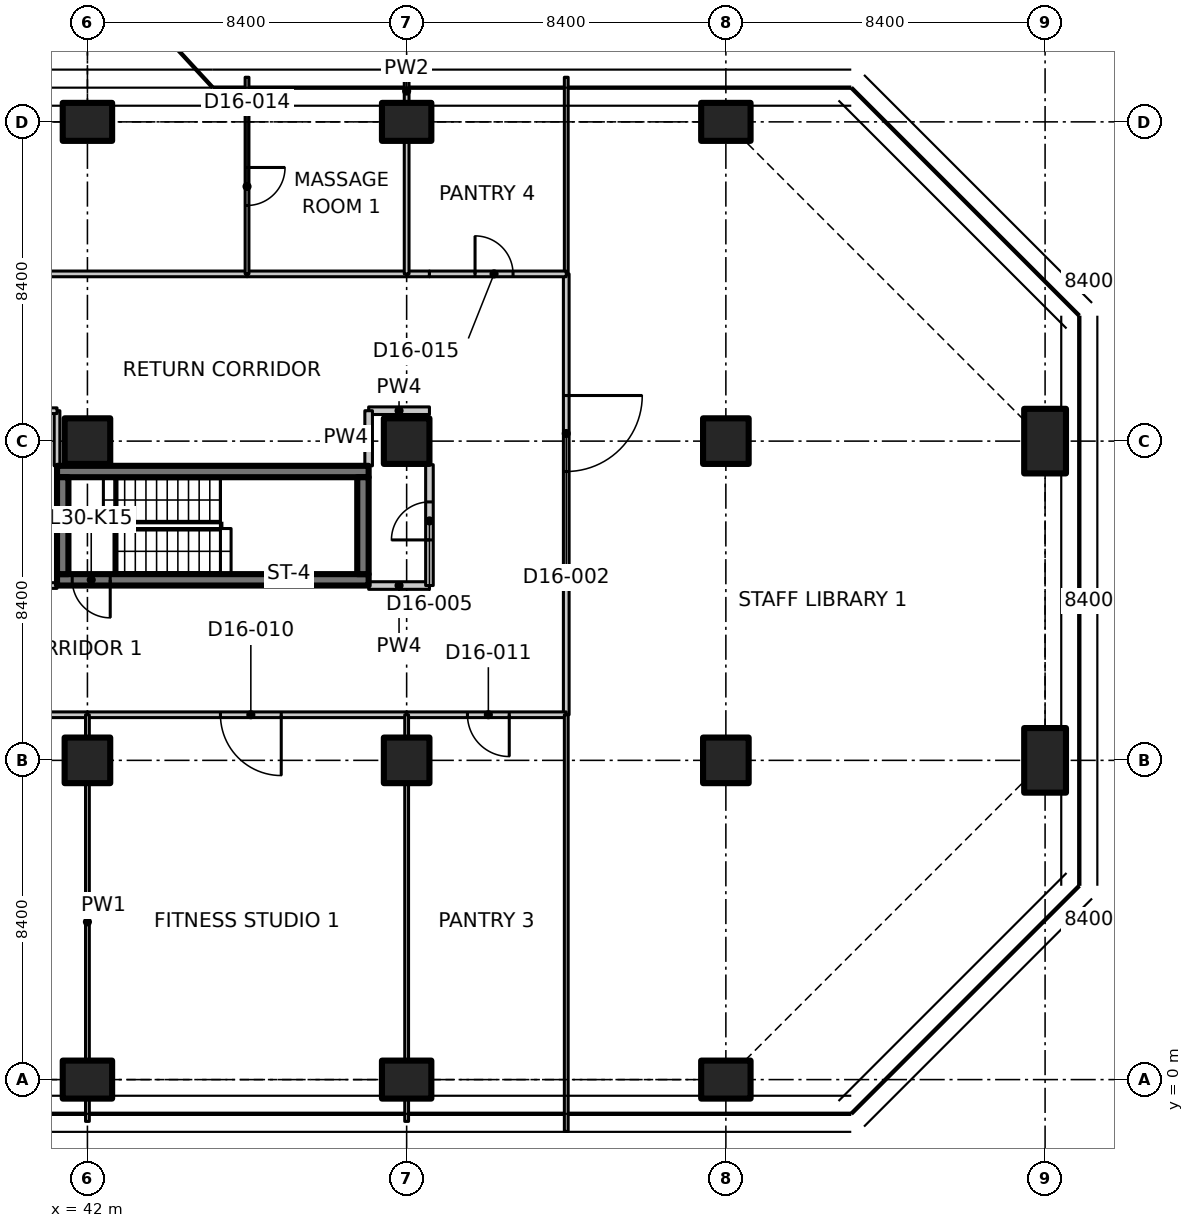
"""IFC4 building model, lengths in metres.
Left out: names, types, materials, properties, quantities, classifications, styles, units other than length and angle.
Written with IfcOpenShell. Run it as: python <this file> out.ifc"""

import sys

from ifc_helpers import new_model, si_unit, direction, frame, frame_2d, origin, origin_2d, place, context, subcontext, project, spatial, polyline, rectangle, outline, extrude, element, fill, save


model = new_model("IFC4")
c1 = context("Model", 3, precision=1e-05, world=origin(), true_north=direction((0.0, 1.0)))
c2 = subcontext(c1, "Body", "Model", "MODEL_VIEW")
j1 = project(units=[si_unit("LENGTHUNIT", "METRE"), si_unit("PLANEANGLEUNIT", "RADIAN")], contexts=[c1])
p1 = place(None, origin())
s1 = spatial("IfcSite", under=j1, at=p1, CompositionType="ELEMENT")
p2 = place(p1, origin())
s2 = spatial("IfcBuilding", under=s1, at=p2, CompositionType="ELEMENT")
p3 = place(p2, frame((0.0, 0.0, 124.1)))
s3 = spatial("IfcBuildingStorey", under=s2, at=p3, CompositionType="ELEMENT", Elevation=124.1)
p4 = place(p3, frame((42.0, 0.0, 0.0), z_axis=(0.0, 0.0, 1.0), x_axis=(0.0, 1.0, 0.0)))
e1 = element("IfcColumn", 1, at=p4, inside=s3, PredefinedType="COLUMN", context=c2, shape_type="SweptSolid", body=[
    extrude(rectangle(XDim=1.0, YDim=1.3, at=origin_2d()), origin(), (0.0, 0.0, 1.0), 3.35),
])
for number, where, z_axis, x_axis in (
    (2, (42.0, 8.4, 0.0), (0.0, 0.0, 1.0), (1.0, 0.0, 0.0)),
    (3, (42.0, 16.8, 0.0), (0.0, 0.0, 1.0), (1.0, 0.0, 0.0)),
):
    element("IfcColumn", number, at=place(p3, frame(where, z_axis=z_axis, x_axis=x_axis)), inside=s3, PredefinedType="COLUMN", context=c2, shape_type="SweptSolid", body=[
        extrude(rectangle(XDim=1.2, YDim=1.2, at=origin_2d()), origin(), (0.0, 0.0, 1.0), 3.35),
    ])
for number, where, z_axis, x_axis in (
    (4, (42.0, 25.2, 0.0), (0.0, 0.0, 1.0), (0.0, 1.0, 0.0)),
    (5, (50.4, 0.0, 0.0), (0.0, 0.0, 1.0), (0.0, 1.0, 0.0)),
):
    element("IfcColumn", number, at=place(p3, frame(where, z_axis=z_axis, x_axis=x_axis)), inside=s3, PredefinedType="COLUMN", context=c2, shape_type="SweptSolid", body=[
        extrude(rectangle(XDim=1.0, YDim=1.3, at=origin_2d()), origin(), (0.0, 0.0, 1.0), 3.35),
    ])
for number, where, z_axis, x_axis in (
    (6, (50.4, 8.4, 0.0), (0.0, 0.0, 1.0), (1.0, 0.0, 0.0)),
    (7, (50.4, 16.8, 0.0), (0.0, 0.0, 1.0), (1.0, 0.0, 0.0)),
):
    element("IfcColumn", number, at=place(p3, frame(where, z_axis=z_axis, x_axis=x_axis)), inside=s3, PredefinedType="COLUMN", context=c2, shape_type="SweptSolid", body=[
        extrude(rectangle(XDim=1.2, YDim=1.2, at=origin_2d()), origin(), (0.0, 0.0, 1.0), 3.35),
    ])
for number, where, z_axis, x_axis in (
    (8, (50.4, 25.2, 0.0), (0.0, 0.0, 1.0), (0.0, 1.0, 0.0)),
    (9, (58.8, 0.0, 0.0), (0.0, 0.0, 1.0), (0.0, 1.0, 0.0)),
):
    element("IfcColumn", number, at=place(p3, frame(where, z_axis=z_axis, x_axis=x_axis)), inside=s3, PredefinedType="COLUMN", context=c2, shape_type="SweptSolid", body=[
        extrude(rectangle(XDim=1.0, YDim=1.3, at=origin_2d()), origin(), (0.0, 0.0, 1.0), 3.35),
    ])
for number, where, z_axis, x_axis in (
    (10, (58.8, 8.4, 0.0), (0.0, 0.0, 1.0), (1.0, 0.0, 0.0)),
    (11, (58.8, 16.8, 0.0), (0.0, 0.0, 1.0), (1.0, 0.0, 0.0)),
):
    element("IfcColumn", number, at=place(p3, frame(where, z_axis=z_axis, x_axis=x_axis)), inside=s3, PredefinedType="COLUMN", context=c2, shape_type="SweptSolid", body=[
        extrude(rectangle(XDim=1.2, YDim=1.2, at=origin_2d()), origin(), (0.0, 0.0, 1.0), 3.35),
    ])
p5 = place(p3, frame((58.8, 25.2, 0.0), z_axis=(0.0, 0.0, 1.0), x_axis=(0.0, 1.0, 0.0)))
e12 = element("IfcColumn", 12, at=p5, inside=s3, PredefinedType="COLUMN", context=c2, shape_type="SweptSolid", body=[
    extrude(rectangle(XDim=1.0, YDim=1.3, at=origin_2d()), origin(), (0.0, 0.0, 1.0), 3.35),
])
for number, where, z_axis, x_axis in (
    (13, (67.2, 8.4, 0.0), (0.0, 0.0, 1.0), (1.0, 0.0, 0.0)),
    (14, (67.2, 16.8, 0.0), (0.0, 0.0, 1.0), (1.0, 0.0, 0.0)),
):
    element("IfcColumn", number, at=place(p3, frame(where, z_axis=z_axis, x_axis=x_axis)), inside=s3, PredefinedType="COLUMN", context=c2, shape_type="SweptSolid", body=[
        extrude(rectangle(XDim=1.1, YDim=1.7, at=origin_2d()), origin(), (0.0, 0.0, 1.0), 3.35),
    ])
p6 = place(p3, frame((49.4, 13.15, 0.0), z_axis=(0.0, 0.0, 1.0), x_axis=(-1.0, 0.0, 0.0)))
e15 = element("IfcWall", 15, at=p6, inside=s3, PredefinedType="SHEAR", context=c2, shape_type="SweptSolid", body=[
    extrude(rectangle(XDim=8.2, YDim=0.3, at=frame_2d((4.1, 0.0))), origin(), (0.0, 0.0, 1.0), 3.35),
])
p7 = place(p6, frame((6.8, 0.0, 0.0)))
e16 = element("IfcOpeningElement", 16, at=p7, cuts=e15, PredefinedType="OPENING", context=c2, shape_type="SweptSolid", body=[
    extrude(rectangle(XDim=1.0, YDim=2.1, at=frame_2d((0.5, 1.05))), frame((0.0, 0.16, 0.0), z_axis=(0.0, -1.0, 0.0), x_axis=(1.0, 0.0, 0.0)), (0.0, 0.0, 1.0), 0.32),
])
p8 = place(p3, frame((41.2, 16.0, 0.0), z_axis=(0.0, 0.0, 1.0), x_axis=(1.0, 0.0, 0.0)))
e17 = element("IfcWall", 17, at=p8, inside=s3, PredefinedType="SHEAR", context=c2, shape_type="SweptSolid", body=[
    extrude(rectangle(XDim=8.2, YDim=0.3, at=frame_2d((4.1, 0.0))), origin(), (0.0, 0.0, 1.0), 3.35),
])
for number, where, z_axis, x_axis in (
    (18, (41.35, 13.3, 0.0), (0.0, 0.0, 1.0), (0.0, 1.0, 0.0)),
    (19, (49.25, 13.3, 0.0), (0.0, 0.0, 1.0), (0.0, 1.0, 0.0)),
):
    element("IfcWall", number, at=place(p3, frame(where, z_axis=z_axis, x_axis=x_axis)), inside=s3, PredefinedType="SHEAR", context=c2, shape_type="SweptSolid", body=[
        extrude(rectangle(XDim=2.55, YDim=0.3, at=frame_2d((1.275, 0.0))), origin(), (0.0, 0.0, 1.0), 3.35),
    ])
p9 = place(p3, frame((54.6, 13.0, 0.0), z_axis=(0.0, 0.0, 1.0), x_axis=(0.0, -1.0, 0.0)))
e20 = element("IfcWall", 20, at=p9, inside=s3, PredefinedType="PARTITIONING", context=c2, shape_type="SweptSolid", body=[
    extrude(rectangle(XDim=3.4, YDim=0.15, at=frame_2d((1.7, 0.0))), origin(), (0.0, 0.0, 1.0), 3.33),
])
p10 = place(p3, frame((33.6, 13.0, 0.0), z_axis=(0.0, 0.0, 1.0), x_axis=(1.0, 0.0, 0.0)))
e21 = element("IfcWall", 21, at=p10, inside=s3, PredefinedType="PARTITIONING", context=c2, shape_type="SweptSolid", body=[
    extrude(rectangle(XDim=7.6, YDim=0.15, at=frame_2d((3.8, 0.0))), origin(), (0.0, 0.0, 1.0), 3.33),
])
p11 = place(p3, frame((49.4, 13.0, 0.0), z_axis=(0.0, 0.0, 1.0), x_axis=(1.0, 0.0, 0.0)))
e22 = element("IfcWall", 22, at=p11, inside=s3, PredefinedType="PARTITIONING", context=c2, shape_type="SweptSolid", body=[
    extrude(rectangle(XDim=1.6, YDim=0.2, at=frame_2d((0.8, 0.0))), origin(), (0.0, 0.0, 1.0), 3.33),
])
p12 = place(p3, frame((42.0, 9.6, 0.0), z_axis=(0.0, 0.0, 1.0), x_axis=(-1.0, 0.0, 0.0)))
e23 = element("IfcWall", 23, at=p12, inside=s3, PredefinedType="PARTITIONING", context=c2, shape_type="SweptSolid", body=[
    extrude(rectangle(XDim=4.2, YDim=0.15, at=frame_2d((2.1, 0.0))), origin(), (0.0, 0.0, 1.0), 3.33),
])
p13 = place(p12, frame((1.5, 0.0, 0.0)))
e24 = element("IfcOpeningElement", 24, at=p13, cuts=e23, PredefinedType="OPENING", context=c2, shape_type="SweptSolid", body=[
    extrude(rectangle(XDim=1.1, YDim=2.1, at=frame_2d((0.55, 1.05))), frame((0.0, 0.085, 0.0), z_axis=(0.0, -1.0, 0.0), x_axis=(1.0, 0.0, 0.0)), (0.0, 0.0, 1.0), 0.17),
])
p14 = place(p3, frame((50.4, 9.6, 0.0), z_axis=(0.0, 0.0, 1.0), x_axis=(-1.0, 0.0, 0.0)))
e25 = element("IfcWall", 25, at=p14, inside=s3, PredefinedType="PARTITIONING", context=c2, shape_type="SweptSolid", body=[
    extrude(rectangle(XDim=8.4, YDim=0.15, at=frame_2d((4.2, 0.0))), origin(), (0.0, 0.0, 1.0), 3.33),
])
p15 = place(p14, frame((3.3, 0.0, 0.0)))
e26 = element("IfcOpeningElement", 26, at=p15, cuts=e25, PredefinedType="OPENING", context=c2, shape_type="SweptSolid", body=[
    extrude(rectangle(XDim=1.6, YDim=2.1, at=frame_2d((0.8, 1.05))), frame((0.0, 0.085, 0.0), z_axis=(0.0, -1.0, 0.0), x_axis=(1.0, 0.0, 0.0)), (0.0, 0.0, 1.0), 0.17),
])
p16 = place(p3, frame((54.6, 9.6, 0.0), z_axis=(0.0, 0.0, 1.0), x_axis=(-1.0, 0.0, 0.0)))
e27 = element("IfcWall", 27, at=p16, inside=s3, PredefinedType="PARTITIONING", context=c2, shape_type="SweptSolid", body=[
    extrude(rectangle(XDim=4.2, YDim=0.15, at=frame_2d((2.1, 0.0))), origin(), (0.0, 0.0, 1.0), 3.33),
])
p17 = place(p16, frame((1.5, 0.0, 0.0)))
e28 = element("IfcOpeningElement", 28, at=p17, cuts=e27, PredefinedType="OPENING", context=c2, shape_type="SweptSolid", body=[
    extrude(rectangle(XDim=1.1, YDim=2.1, at=frame_2d((0.55, 1.05))), frame((0.0, 0.085, 0.0), z_axis=(0.0, -1.0, 0.0), x_axis=(1.0, 0.0, 0.0)), (0.0, 0.0, 1.0), 0.17),
])
p18 = place(p3, frame((54.6, 21.2, 0.0), z_axis=(0.0, 0.0, 1.0), x_axis=(0.0, -1.0, 0.0)))
e29 = element("IfcWall", 29, at=p18, inside=s3, PredefinedType="PARTITIONING", context=c2, shape_type="SweptSolid", body=[
    extrude(rectangle(XDim=8.2, YDim=0.15, at=frame_2d((4.1, 0.0))), origin(), (0.0, 0.0, 1.0), 3.33),
])
p19 = place(p18, frame((3.2, 0.0, 0.0)))
e30 = element("IfcOpeningElement", 30, at=p19, cuts=e29, PredefinedType="OPENING", context=c2, shape_type="SweptSolid", body=[
    extrude(rectangle(XDim=2.0, YDim=2.4, at=frame_2d((1.0, 1.2))), frame((0.0, 0.085, 0.0), z_axis=(0.0, -1.0, 0.0), x_axis=(1.0, 0.0, 0.0)), (0.0, 0.0, 1.0), 0.17),
])
p20 = place(p3, frame((54.6, -1.365, 0.0), z_axis=(0.0, 0.0, 1.0), x_axis=(0.0, 1.0, 0.0)))
e31 = element("IfcWall", 31, at=p20, inside=s3, PredefinedType="PARTITIONING", context=c2, shape_type="SweptSolid", body=[
    extrude(outline(polyline([(0.0, 0.0), (10.965, 0.0), (10.965, 3.33), (1.815, 3.33), (1.813, 2.98), (0.917, 2.98), (0.915, 3.33), (0.265, 3.33), (0.0, 3.33), (0.0, 0.0)])), frame((0.0, 0.05, 0.0), z_axis=(0.0, -1.0, 0.0), x_axis=(1.0, 0.0, 0.0)), (0.0, 0.0, 1.0), 0.1),
])
p21 = place(p3, frame((54.6, 21.2, 0.0), z_axis=(0.0, 0.0, 1.0), x_axis=(0.0, 1.0, 0.0)))
e32 = element("IfcWall", 32, at=p21, inside=s3, PredefinedType="PARTITIONING", context=c2, shape_type="SweptSolid", body=[
    extrude(outline(polyline([(0.0, 0.0), (5.174, 0.0), (5.174, 3.33), (5.1, 3.33), (4.45, 3.33), (4.448, 2.98), (3.552, 2.98), (3.55, 3.33), (0.0, 3.33), (0.0, 0.0)])), frame((0.0, 0.05, 0.0), z_axis=(0.0, -1.0, 0.0), x_axis=(1.0, 0.0, 0.0)), (0.0, 0.0, 1.0), 0.1),
])
p22 = place(p3, frame((41.2, 16.15, 0.0), z_axis=(0.0, 0.0, 1.0), x_axis=(0.0, 1.0, 0.0)))
e33 = element("IfcWall", 33, at=p22, inside=s3, PredefinedType="PARTITIONING", context=c2, shape_type="SweptSolid", body=[
    extrude(rectangle(XDim=1.45, YDim=0.15, at=frame_2d((0.725, 0.0))), origin(), (0.0, 0.0, 1.0), 3.33),
])
p23 = place(p3, frame((41.2, 17.6, 0.0), z_axis=(0.0, 0.0, 1.0), x_axis=(-1.0, 0.0, 0.0)))
e34 = element("IfcWall", 34, at=p23, inside=s3, PredefinedType="PARTITIONING", context=c2, shape_type="SweptSolid", body=[
    extrude(rectangle(XDim=7.6, YDim=0.15, at=frame_2d((3.8, 0.0))), origin(), (0.0, 0.0, 1.0), 3.33),
])
p24 = place(p23, frame((3.3, 0.0, 0.0)))
e35 = element("IfcOpeningElement", 35, at=p24, cuts=e34, PredefinedType="OPENING", context=c2, shape_type="SweptSolid", body=[
    extrude(rectangle(XDim=1.1, YDim=2.1, at=frame_2d((0.55, 1.05))), frame((0.0, 0.085, 0.0), z_axis=(0.0, -1.0, 0.0), x_axis=(1.0, 0.0, 0.0)), (0.0, 0.0, 1.0), 0.17),
])
p25 = place(p3, frame((51.0, 17.6, 0.0), z_axis=(0.0, 0.0, 1.0), x_axis=(-1.0, 0.0, 0.0)))
e36 = element("IfcWall", 36, at=p25, inside=s3, PredefinedType="PARTITIONING", context=c2, shape_type="SweptSolid", body=[
    extrude(rectangle(XDim=1.6, YDim=0.2, at=frame_2d((0.8, 0.0))), origin(), (0.0, 0.0, 1.0), 3.33),
])
p26 = place(p3, frame((49.4, 17.6, 0.0), z_axis=(0.0, 0.0, 1.0), x_axis=(0.0, -1.0, 0.0)))
e37 = element("IfcWall", 37, at=p26, inside=s3, PredefinedType="PARTITIONING", context=c2, shape_type="SweptSolid", body=[
    extrude(rectangle(XDim=1.45, YDim=0.2, at=frame_2d((0.725, 0.0))), origin(), (0.0, 0.0, 1.0), 3.33),
])
p27 = place(p3, frame((33.6, 21.2, 0.0), z_axis=(0.0, 0.0, 1.0), x_axis=(1.0, 0.0, 0.0)))
e38 = element("IfcWall", 38, at=p27, inside=s3, PredefinedType="PARTITIONING", context=c2, shape_type="SweptSolid", body=[
    extrude(rectangle(XDim=12.6, YDim=0.15, at=frame_2d((6.3, 0.0))), origin(), (0.0, 0.0, 1.0), 3.33),
])
p28 = place(p27, frame((5.4, 0.0, 0.0)))
e39 = element("IfcOpeningElement", 39, at=p28, cuts=e38, PredefinedType="OPENING", context=c2, shape_type="SweptSolid", body=[
    extrude(rectangle(XDim=1.6, YDim=2.1, at=frame_2d((0.8, 1.05))), frame((0.0, 0.085, 0.0), z_axis=(0.0, -1.0, 0.0), x_axis=(1.0, 0.0, 0.0)), (0.0, 0.0, 1.0), 0.17),
])
p29 = place(p3, frame((46.2, 21.2, 0.0), z_axis=(0.0, 0.0, 1.0), x_axis=(1.0, 0.0, 0.0)))
e40 = element("IfcWall", 40, at=p29, inside=s3, PredefinedType="PARTITIONING", context=c2, shape_type="SweptSolid", body=[
    extrude(rectangle(XDim=4.2, YDim=0.15, at=frame_2d((2.1, 0.0))), origin(), (0.0, 0.0, 1.0), 3.33),
])
p30 = place(p3, frame((50.4, 21.2, 0.0), z_axis=(0.0, 0.0, 1.0), x_axis=(1.0, 0.0, 0.0)))
e41 = element("IfcWall", 41, at=p30, inside=s3, PredefinedType="PARTITIONING", context=c2, shape_type="SweptSolid", body=[
    extrude(rectangle(XDim=0.6, YDim=0.15, at=frame_2d((0.3, 0.0))), origin(), (0.0, 0.0, 1.0), 3.33),
])
p31 = place(p3, frame((51.0, 13.0, 0.0), z_axis=(0.0, 0.0, 1.0), x_axis=(0.0, 1.0, 0.0)))
e42 = element("IfcWall", 42, at=p31, inside=s3, PredefinedType="PARTITIONING", context=c2, shape_type="SweptSolid", body=[
    extrude(rectangle(XDim=3.18, YDim=0.2, at=frame_2d((1.59, 0.0))), origin(), (0.0, 0.0, 1.0), 3.33),
])
p32 = place(p31, frame((1.2, 0.0, 0.0)))
e43 = element("IfcOpeningElement", 43, at=p32, cuts=e42, PredefinedType="OPENING", context=c2, shape_type="SweptSolid", body=[
    extrude(rectangle(XDim=1.0, YDim=2.1, at=frame_2d((0.5, 1.05))), frame((0.0, 0.11, 0.0), z_axis=(0.0, -1.0, 0.0), x_axis=(1.0, 0.0, 0.0)), (0.0, 0.0, 1.0), 0.22),
])
p33 = place(p3, frame((51.0, 21.2, 0.0), z_axis=(0.0, 0.0, 1.0), x_axis=(1.0, 0.0, 0.0)))
e44 = element("IfcWall", 44, at=p33, inside=s3, PredefinedType="PARTITIONING", context=c2, shape_type="SweptSolid", body=[
    extrude(rectangle(XDim=3.6, YDim=0.15, at=frame_2d((1.8, 0.0))), origin(), (0.0, 0.0, 1.0), 3.33),
])
p34 = place(p33, frame((1.2, 0.0, 0.0)))
e45 = element("IfcOpeningElement", 45, at=p34, cuts=e44, PredefinedType="OPENING", context=c2, shape_type="SweptSolid", body=[
    extrude(rectangle(XDim=1.0, YDim=2.1, at=frame_2d((0.5, 1.05))), frame((0.0, 0.085, 0.0), z_axis=(0.0, -1.0, 0.0), x_axis=(1.0, 0.0, 0.0)), (0.0, 0.0, 1.0), 0.17),
])
p35 = place(p3, frame((42.0, 9.6, 0.0), z_axis=(0.0, 0.0, 1.0), x_axis=(0.0, -1.0, 0.0)))
e46 = element("IfcWall", 46, at=p35, inside=s3, PredefinedType="PARTITIONING", context=c2, shape_type="SweptSolid", body=[
    extrude(rectangle(XDim=0.58, YDim=0.1, at=frame_2d((0.29, 0.0))), origin(), (0.0, 0.0, 1.0), 3.33),
])
p36 = place(p3, frame((42.0, 7.78, 0.0), z_axis=(0.0, 0.0, 1.0), x_axis=(0.0, -1.0, 0.0)))
e47 = element("IfcWall", 47, at=p36, inside=s3, PredefinedType="PARTITIONING", context=c2, shape_type="SweptSolid", body=[
    extrude(rectangle(XDim=7.26, YDim=0.1, at=frame_2d((3.63, 0.0))), origin(), (0.0, 0.0, 1.0), 3.33),
])
for number, where, z_axis, x_axis in (
    (48, (42.0, -0.52, 0.0), (0.0, 0.0, 1.0), (0.0, -1.0, 0.0)),
    (49, (50.4, 9.6, 0.0), (0.0, 0.0, 1.0), (0.0, -1.0, 0.0)),
):
    element("IfcWall", number, at=place(p3, frame(where, z_axis=z_axis, x_axis=x_axis)), inside=s3, PredefinedType="PARTITIONING", context=c2, shape_type="SweptSolid", body=[
        extrude(rectangle(XDim=0.58, YDim=0.1, at=frame_2d((0.29, 0.0))), origin(), (0.0, 0.0, 1.0), 3.33),
    ])
p37 = place(p3, frame((50.4, 7.78, 0.0), z_axis=(0.0, 0.0, 1.0), x_axis=(0.0, -1.0, 0.0)))
e50 = element("IfcWall", 50, at=p37, inside=s3, PredefinedType="PARTITIONING", context=c2, shape_type="SweptSolid", body=[
    extrude(rectangle(XDim=7.26, YDim=0.1, at=frame_2d((3.63, 0.0))), origin(), (0.0, 0.0, 1.0), 3.33),
])
p38 = place(p3, frame((50.4, -0.52, 0.0), z_axis=(0.0, 0.0, 1.0), x_axis=(0.0, -1.0, 0.0)))
e51 = element("IfcWall", 51, at=p38, inside=s3, PredefinedType="PARTITIONING", context=c2, shape_type="SweptSolid", body=[
    extrude(rectangle(XDim=0.58, YDim=0.1, at=frame_2d((0.29, 0.0))), origin(), (0.0, 0.0, 1.0), 3.33),
])
p39 = place(p3, frame((46.2, 26.374, 0.0), z_axis=(0.0, 0.0, 1.0), x_axis=(0.0, -1.0, 0.0)))
e52 = element("IfcWall", 52, at=p39, inside=s3, PredefinedType="PARTITIONING", context=c2, shape_type="SweptSolid", body=[
    extrude(outline(polyline([(0.0, 0.0), (5.174, 0.0), (5.174, 3.33), (1.624, 3.33), (1.622, 2.98), (0.726, 2.98), (0.724, 3.33), (0.074, 3.33), (0.0, 3.33), (0.0, 0.0)])), frame((0.0, 0.05, 0.0), z_axis=(0.0, -1.0, 0.0), x_axis=(1.0, 0.0, 0.0)), (0.0, 0.0, 1.0), 0.1),
])
p40 = place(p39, frame((2.374, 0.0, 0.0)))
e53 = element("IfcOpeningElement", 53, at=p40, cuts=e52, PredefinedType="OPENING", context=c2, shape_type="SweptSolid", body=[
    extrude(rectangle(XDim=1.0, YDim=2.1, at=frame_2d((0.5, 1.05))), frame((0.0, 0.06, 0.0), z_axis=(0.0, -1.0, 0.0), x_axis=(1.0, 0.0, 0.0)), (0.0, 0.0, 1.0), 0.12),
])
p41 = place(p3, frame((50.4, 26.3, 0.0), z_axis=(0.0, 0.0, 1.0), x_axis=(0.0, -1.0, 0.0)))
e54 = element("IfcWall", 54, at=p41, inside=s3, PredefinedType="PARTITIONING", context=c2, shape_type="SweptSolid", body=[
    extrude(rectangle(XDim=0.58, YDim=0.125, at=frame_2d((0.29, 0.0))), origin(), (0.0, 0.0, 1.0), 3.33),
])
p42 = place(p3, frame((50.4, 24.68, 0.0), z_axis=(0.0, 0.0, 1.0), x_axis=(0.0, -1.0, 0.0)))
e55 = element("IfcWall", 55, at=p42, inside=s3, PredefinedType="PARTITIONING", context=c2, shape_type="SweptSolid", body=[
    extrude(rectangle(XDim=3.48, YDim=0.125, at=frame_2d((1.74, 0.0))), origin(), (0.0, 0.0, 1.0), 3.33),
])
p43 = place(p7, origin())
e56 = element("IfcDoor", 56, at=p43, inside=s3, OperationType="SINGLE_SWING_RIGHT", PredefinedType="DOOR", context=c2, shape_type="SweptSolid", body=[
    extrude(rectangle(XDim=1.0, YDim=2.1, at=frame_2d((0.5, 1.05))), frame((0.0, 0.025, 0.0), z_axis=(0.0, -1.0, 0.0), x_axis=(1.0, 0.0, 0.0)), (0.0, 0.0, 1.0), 0.05),
])
fill(e16, e56)
p44 = place(p19, origin())
e57 = element("IfcDoor", 57, at=p44, inside=s3, OperationType="DOUBLE_DOOR_SINGLE_SWING", PredefinedType="DOOR", context=c2, shape_type="SweptSolid", body=[
    extrude(rectangle(XDim=2.0, YDim=2.4, at=frame_2d((1.0, 1.2))), frame((0.0, 0.025, 0.0), z_axis=(0.0, -1.0, 0.0), x_axis=(1.0, 0.0, 0.0)), (0.0, 0.0, 1.0), 0.05),
])
fill(e30, e57)
p45 = place(p32, origin())
e58 = element("IfcDoor", 58, at=p45, inside=s3, OperationType="SINGLE_SWING_LEFT", PredefinedType="DOOR", context=c2, shape_type="SweptSolid", body=[
    extrude(rectangle(XDim=1.0, YDim=2.1, at=frame_2d((0.5, 1.05))), frame((0.0, 0.025, 0.0), z_axis=(0.0, -1.0, 0.0), x_axis=(1.0, 0.0, 0.0)), (0.0, 0.0, 1.0), 0.05),
])
fill(e43, e58)
p46 = place(p15, origin())
e59 = element("IfcDoor", 59, at=p46, inside=s3, OperationType="DOUBLE_DOOR_SINGLE_SWING", PredefinedType="DOOR", context=c2, shape_type="SweptSolid", body=[
    extrude(rectangle(XDim=1.6, YDim=2.1, at=frame_2d((0.8, 1.05))), frame((0.0, 0.025, 0.0), z_axis=(0.0, -1.0, 0.0), x_axis=(1.0, 0.0, 0.0)), (0.0, 0.0, 1.0), 0.05),
])
fill(e26, e59)
p47 = place(p17, origin())
e60 = element("IfcDoor", 60, at=p47, inside=s3, OperationType="SINGLE_SWING_LEFT", PredefinedType="DOOR", context=c2, shape_type="SweptSolid", body=[
    extrude(rectangle(XDim=1.1, YDim=2.1, at=frame_2d((0.55, 1.05))), frame((0.0, 0.025, 0.0), z_axis=(0.0, -1.0, 0.0), x_axis=(1.0, 0.0, 0.0)), (0.0, 0.0, 1.0), 0.05),
])
fill(e28, e60)
p48 = place(p40, origin())
e61 = element("IfcDoor", 61, at=p48, inside=s3, OperationType="SINGLE_SWING_LEFT", PredefinedType="DOOR", context=c2, shape_type="SweptSolid", body=[
    extrude(rectangle(XDim=1.0, YDim=2.1, at=frame_2d((0.5, 1.05))), frame((0.0, 0.025, 0.0), z_axis=(0.0, -1.0, 0.0), x_axis=(1.0, 0.0, 0.0)), (0.0, 0.0, 1.0), 0.05),
])
fill(e53, e61)
p49 = place(p34, origin())
e62 = element("IfcDoor", 62, at=p49, inside=s3, OperationType="SINGLE_SWING_LEFT", PredefinedType="DOOR", context=c2, shape_type="SweptSolid", body=[
    extrude(rectangle(XDim=1.0, YDim=2.1, at=frame_2d((0.5, 1.05))), frame((0.0, 0.025, 0.0), z_axis=(0.0, -1.0, 0.0), x_axis=(1.0, 0.0, 0.0)), (0.0, 0.0, 1.0), 0.05),
])
fill(e45, e62)
save(model, sys.argv[1])
